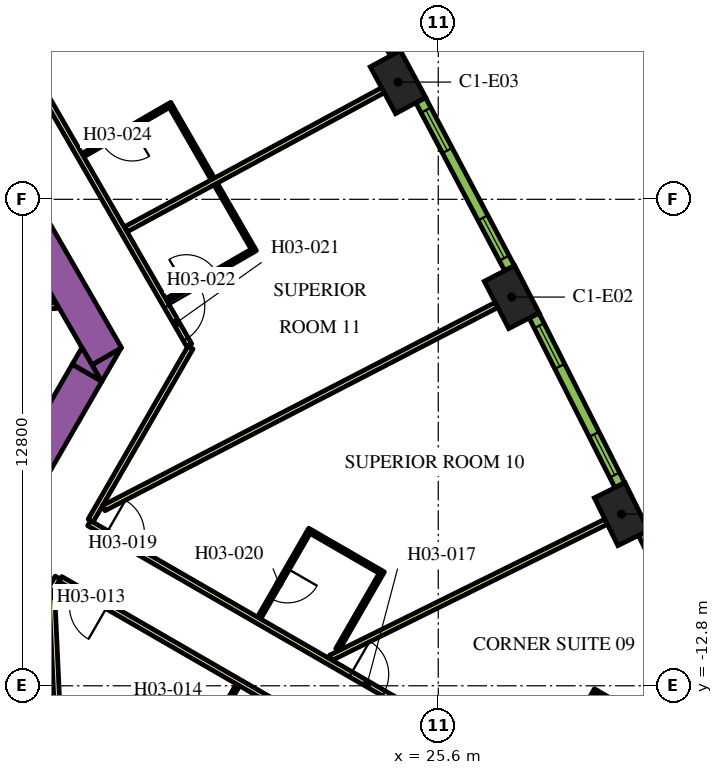
"""IFC4 building model, lengths in metres.
Left out: names, types, materials, properties, quantities, classifications, styles, units other than length and angle.
Written with IfcOpenShell. Run it as: python <this file> out.ifc"""

import sys

from ifc_helpers import new_model, si_unit, direction, frame, frame_2d, origin, origin_2d, place, context, subcontext, project, spatial, polyline, rectangle, outline, extrude, element, fill, save


model = new_model("IFC4")
c1 = context("Model", 3, precision=1e-05, world=origin(), true_north=direction((0.0, 1.0)))
c2 = subcontext(c1, "Body", "Model", "MODEL_VIEW")
j1 = project(units=[si_unit("LENGTHUNIT", "METRE"), si_unit("PLANEANGLEUNIT", "RADIAN")], contexts=[c1])
p1 = place(None, origin())
s1 = spatial("IfcSite", under=j1, at=p1, CompositionType="ELEMENT")
p2 = place(p1, origin())
s2 = spatial("IfcBuilding", under=s1, at=p2, CompositionType="ELEMENT")
p3 = place(p2, frame((0.0, 0.0, 54.9)))
s3 = spatial("IfcBuildingStorey", under=s2, at=p3, CompositionType="ELEMENT", Elevation=54.9)
for number, where, z_axis, x_axis in (
    (1, (30.421, -8.284, 0.0), (0.0, 0.0, 1.0), (-0.443, 0.897, 0.0)),
    (2, (27.533, -2.572, 0.0), (0.0, 0.0, 1.0), (-0.459, 0.888, 0.0)),
    (3, (24.54, 3.085, 0.0), (0.0, 0.0, 1.0), (-0.476, 0.88, 0.0)),
):
    element("IfcColumn", number, at=place(p3, frame(where, z_axis=z_axis, x_axis=x_axis)), inside=s3, PredefinedType="COLUMN", context=c2, shape_type="SweptSolid", body=[
        extrude(rectangle(XDim=1.4, YDim=0.9, at=origin_2d()), origin(), (0.0, 0.0, 1.0), 3.9),
    ])
p4 = place(p3, frame((6.776, 13.364, 0.0), z_axis=(0.0, 0.0, 1.0), x_axis=(0.500004177138, -0.8660229921, 0.0)))
e4 = element("IfcWall", 4, at=p4, inside=s3, PredefinedType="SOLIDWALL", context=c2, shape_type="SweptSolid", body=[
    extrude(rectangle(XDim=20.204, YDim=0.9, at=frame_2d((10.102, 0.0))), origin(), (0.0, 0.0, 1.0), 3.9),
])
p5 = place(p3, origin())
e5 = element("IfcWall", 5, at=p5, inside=s3, PredefinedType="SOLIDWALL", context=c2, shape_type="SweptSolid", body=[
    extrude(outline(polyline([(16.743, -4.8), (16.489, -4.36), (17.251, -3.92), (16.743, -4.8)])), origin(), (0.0, 0.0, 1.0), 3.9),
])
p6 = place(p3, frame((11.695, -12.644, 0.0), z_axis=(0.0, 0.0, 1.0), x_axis=(0.500010229568, 0.86601949766, 0.0)))
e6 = element("IfcWall", 6, at=p6, inside=s3, PredefinedType="SOLIDWALL", context=c2, shape_type="SweptSolid", body=[
    extrude(rectangle(XDim=9.326, YDim=0.9, at=frame_2d((4.663, 0.0))), origin(), (0.0, 0.0, 1.0), 3.9),
])
e7 = element("IfcWall", 7, at=p5, inside=s3, PredefinedType="SOLIDWALL", context=c2, shape_type="SweptSolid", body=[
    extrude(outline(polyline([(16.223, -3.9), (16.732, -4.78), (15.969, -4.34), (16.223, -3.9)])), origin(), (0.0, 0.0, 1.0), 3.9),
])
p7 = place(p3, frame((12.915, -2.8, 0.0), z_axis=(0.0, 0.0, 1.0), x_axis=(1.0, 0.0, 0.0)))
e8 = element("IfcWall", 8, at=p7, inside=s3, PredefinedType="PARTITIONING", context=c2, shape_type="SweptSolid", body=[
    extrude(rectangle(XDim=2.637, YDim=0.15, at=frame_2d((1.318, 0.0))), origin(), (0.0, 0.0, 1.0), 2.75),
])
p8 = place(p3, frame((16.412, -8.523, 0.0), z_axis=(0.0, 0.0, 1.0), x_axis=(0.866022197818, -0.500005552856, 0.0)))
e9 = element("IfcWall", 9, at=p8, inside=s3, PredefinedType="PARTITIONING", context=c2, shape_type="SweptSolid", body=[
    extrude(rectangle(XDim=16.224, YDim=0.15, at=frame_2d((8.112, 0.0))), origin(), (0.0, 0.0, 1.0), 2.75),
])
p9 = place(p8, frame((7.949, 0.0, 0.0)))
e10 = element("IfcOpeningElement", 10, at=p9, cuts=e9, PredefinedType="OPENING", context=c2, shape_type="SweptSolid", body=[
    extrude(rectangle(XDim=1.0, YDim=2.1, at=frame_2d((0.5, 1.05))), frame((0.0, 0.085, 0.0), z_axis=(0.0, -1.0, 0.0), x_axis=(1.0, 0.0, 0.0)), (0.0, 0.0, 1.0), 0.17),
])
p10 = place(p8, frame((0.526, 0.0, 0.0)))
e11 = element("IfcOpeningElement", 11, at=p10, cuts=e9, PredefinedType="OPENING", context=c2, shape_type="SweptSolid", body=[
    extrude(rectangle(XDim=1.0, YDim=2.1, at=frame_2d((0.5, 1.05))), frame((0.0, 0.085, 0.0), z_axis=(0.0, -1.0, 0.0), x_axis=(1.0, 0.0, 0.0)), (0.0, 0.0, 1.0), 0.17),
])
p11 = place(p3, frame((19.081, -3.9, 0.0), z_axis=(0.0, 0.0, 1.0), x_axis=(-0.499974327079, -0.866040225545, 0.0)))
e12 = element("IfcWall", 12, at=p11, inside=s3, PredefinedType="PARTITIONING", context=c2, shape_type="SweptSolid", body=[
    extrude(rectangle(XDim=5.258, YDim=0.15, at=frame_2d((2.629, 0.0))), origin(), (0.0, 0.0, 1.0), 2.75),
])
p12 = place(p3, frame((6.163, 18.475, 0.0), z_axis=(0.0, 0.0, 1.0), x_axis=(0.500001317485, -0.866024643133, 0.0)))
e13 = element("IfcWall", 13, at=p12, inside=s3, PredefinedType="PARTITIONING", context=c2, shape_type="SweptSolid", body=[
    extrude(rectangle(XDim=25.767, YDim=0.15, at=frame_2d((12.883, 0.0))), origin(), (0.0, 0.0, 1.0), 2.75),
])
p13 = place(p12, frame((24.586, 0.0, 0.0)))
e14 = element("IfcOpeningElement", 14, at=p13, cuts=e13, PredefinedType="OPENING", context=c2, shape_type="SweptSolid", body=[
    extrude(rectangle(XDim=1.0, YDim=2.1, at=frame_2d((0.5, 1.05))), frame((0.0, 0.085, 0.0), z_axis=(0.0, -1.0, 0.0), x_axis=(1.0, 0.0, 0.0)), (0.0, 0.0, 1.0), 0.17),
])
p14 = place(p12, frame((13.144, 0.0, 0.0)))
e15 = element("IfcOpeningElement", 15, at=p14, cuts=e13, PredefinedType="OPENING", context=c2, shape_type="SweptSolid", body=[
    extrude(rectangle(XDim=1.0, YDim=2.1, at=frame_2d((0.5, 1.05))), frame((0.0, 0.085, 0.0), z_axis=(0.0, -1.0, 0.0), x_axis=(1.0, 0.0, 0.0)), (0.0, 0.0, 1.0), 0.17),
])
p15 = place(p12, frame((11.692, 0.0, 0.0)))
e16 = element("IfcOpeningElement", 16, at=p15, cuts=e13, PredefinedType="OPENING", context=c2, shape_type="SweptSolid", body=[
    extrude(rectangle(XDim=1.0, YDim=2.1, at=frame_2d((0.5, 1.05))), frame((0.0, 0.085, 0.0), z_axis=(0.0, -1.0, 0.0), x_axis=(1.0, 0.0, 0.0)), (0.0, 0.0, 1.0), 0.17),
])
p16 = place(p12, frame((0.572, 0.0, 0.0)))
e17 = element("IfcOpeningElement", 17, at=p16, cuts=e13, PredefinedType="OPENING", context=c2, shape_type="SweptSolid", body=[
    extrude(rectangle(XDim=1.0, YDim=2.1, at=frame_2d((0.5, 1.05))), frame((0.0, 0.085, 0.0), z_axis=(0.0, -1.0, 0.0), x_axis=(1.0, 0.0, 0.0)), (0.0, 0.0, 1.0), 0.17),
])
p17 = place(p3, frame((15.587, -9.952, 0.0), z_axis=(0.0, 0.0, 1.0), x_axis=(-0.500016618951, -0.866015808616, 0.0)))
e18 = element("IfcWall", 18, at=p17, inside=s3, PredefinedType="PARTITIONING", context=c2, shape_type="SweptSolid", body=[
    extrude(rectangle(XDim=5.268, YDim=0.15, at=frame_2d((2.634, 0.0))), origin(), (0.0, 0.0, 1.0), 2.75),
])
p18 = place(p3, frame((29.638, -18.064, 0.0), z_axis=(0.0, 0.0, 1.0), x_axis=(-0.866026175601, 0.499998663172, 0.0)))
e19 = element("IfcWall", 19, at=p18, inside=s3, PredefinedType="PARTITIONING", context=c2, shape_type="SweptSolid", body=[
    extrude(rectangle(XDim=16.144, YDim=0.15, at=frame_2d((8.072, 0.0))), origin(), (0.0, 0.0, 1.0), 2.75),
])
p19 = place(p18, frame((14.714, 0.0, 0.0)))
e20 = element("IfcOpeningElement", 20, at=p19, cuts=e19, PredefinedType="OPENING", context=c2, shape_type="SweptSolid", body=[
    extrude(rectangle(XDim=1.0, YDim=2.1, at=frame_2d((0.5, 1.05))), frame((0.0, 0.085, 0.0), z_axis=(0.0, -1.0, 0.0), x_axis=(1.0, 0.0, 0.0)), (0.0, 0.0, 1.0), 0.17),
])
p20 = place(p18, frame((7.275, 0.0, 0.0)))
e21 = element("IfcOpeningElement", 21, at=p20, cuts=e19, PredefinedType="OPENING", context=c2, shape_type="SweptSolid", body=[
    extrude(rectangle(XDim=1.0, YDim=2.1, at=frame_2d((0.5, 1.05))), frame((0.0, 0.085, 0.0), z_axis=(0.0, -1.0, 0.0), x_axis=(1.0, 0.0, 0.0)), (0.0, 0.0, 1.0), 0.17),
])
p21 = place(p3, frame((15.973, -22.109, 0.0), z_axis=(0.0, 0.0, 1.0), x_axis=(-0.046191717129, 0.998932592955, 0.0)))
e22 = element("IfcWall", 22, at=p21, inside=s3, PredefinedType="PARTITIONING", context=c2, shape_type="SweptSolid", body=[
    extrude(rectangle(XDim=11.638, YDim=0.15, at=frame_2d((5.819, 0.0))), origin(), (0.0, 0.0, 1.0), 2.75),
])
p22 = place(p3, frame((27.134, -2.779, 0.0), z_axis=(0.0, 0.0, 1.0), x_axis=(-0.8882049501, -0.459447457951, 0.0)))
e23 = element("IfcWall", 23, at=p22, inside=s3, PredefinedType="PARTITIONING", context=c2, shape_type="SweptSolid", body=[
    extrude(rectangle(XDim=11.638, YDim=0.15, at=frame_2d((5.819, 0.0))), origin(), (0.0, 0.0, 1.0), 2.75),
])
p23 = place(p3, frame((24.145, 2.871, 0.0), z_axis=(0.0, 0.0, 1.0), x_axis=(-0.879551725039, -0.475803281809, 0.0)))
e24 = element("IfcWall", 24, at=p23, inside=s3, PredefinedType="PARTITIONING", context=c2, shape_type="SweptSolid", body=[
    extrude(rectangle(XDim=7.688, YDim=0.15, at=frame_2d((3.844, 0.0))), origin(), (0.0, 0.0, 1.0), 2.75),
])
p24 = place(p3, frame((30.018, -8.483, 0.0), z_axis=(0.0, 0.0, 1.0), x_axis=(-0.896544505264, -0.44295366584, 0.0)))
e25 = element("IfcWall", 25, at=p24, inside=s3, PredefinedType="PARTITIONING", context=c2, shape_type="SweptSolid", body=[
    extrude(rectangle(XDim=8.079, YDim=0.15, at=frame_2d((4.04, 0.0))), origin(), (0.0, 0.0, 1.0), 2.75),
])
p25 = place(p3, frame((20.33, -12.777, 0.0), z_axis=(0.0, 0.0, 1.0), x_axis=(-0.500006934395, -0.866021400173, 0.0)))
e26 = element("IfcWall", 26, at=p25, inside=s3, PredefinedType="PARTITIONING", context=c2, shape_type="SweptSolid", body=[
    extrude(rectangle(XDim=2.6, YDim=0.1, at=frame_2d((1.3, 0.0))), origin(), (0.0, 0.0, 1.0), 2.75),
])
p26 = place(p25, frame((0.6, 0.0, 0.0)))
e27 = element("IfcOpeningElement", 27, at=p26, cuts=e26, PredefinedType="OPENING", context=c2, shape_type="SweptSolid", body=[
    extrude(rectangle(XDim=0.9, YDim=2.1, at=frame_2d((0.45, 1.05))), frame((0.0, 0.06, 0.0), z_axis=(0.0, -1.0, 0.0), x_axis=(1.0, 0.0, 0.0)), (0.0, 0.0, 1.0), 0.12),
])
p27 = place(p3, frame((29.752, -12.905, 0.0), z_axis=(0.0, 0.0, 1.0), x_axis=(-0.500049511043, -0.865996816683, 0.0)))
e28 = element("IfcWall", 28, at=p27, inside=s3, PredefinedType="PARTITIONING", context=c2, shape_type="SweptSolid", body=[
    extrude(rectangle(XDim=2.8, YDim=0.1, at=frame_2d((1.4, 0.0))), origin(), (0.0, 0.0, 1.0), 2.75),
])
p28 = place(p27, frame((1.3, 0.0, 0.0)))
e29 = element("IfcOpeningElement", 29, at=p28, cuts=e28, PredefinedType="OPENING", context=c2, shape_type="SweptSolid", body=[
    extrude(rectangle(XDim=0.9, YDim=2.1, at=frame_2d((0.45, 1.05))), frame((0.0, 0.06, 0.0), z_axis=(0.0, -1.0, 0.0), x_axis=(1.0, 0.0, 0.0)), (0.0, 0.0, 1.0), 0.12),
])
p29 = place(p3, frame((29.771, -12.973, 0.0), z_axis=(0.0, 0.0, 1.0), x_axis=(0.865980596518, -0.500077600433, 0.0)))
e30 = element("IfcWall", 30, at=p29, inside=s3, PredefinedType="PARTITIONING", context=c2, shape_type="SweptSolid", body=[
    extrude(rectangle(XDim=2.4, YDim=0.1, at=frame_2d((1.2, 0.0))), origin(), (0.0, 0.0, 1.0), 2.75),
])
p30 = place(p3, frame((22.234, -8.68, 0.0), z_axis=(0.0, 0.0, 1.0), x_axis=(-0.50000943426, -0.866019956843, 0.0)))
e31 = element("IfcWall", 31, at=p30, inside=s3, PredefinedType="PARTITIONING", context=c2, shape_type="SweptSolid", body=[
    extrude(rectangle(XDim=2.7, YDim=0.1, at=frame_2d((1.35, 0.0))), origin(), (0.0, 0.0, 1.0), 2.75),
])
p31 = place(p30, frame((1.2, 0.0, 0.0)))
e32 = element("IfcOpeningElement", 32, at=p31, cuts=e31, PredefinedType="OPENING", context=c2, shape_type="SweptSolid", body=[
    extrude(rectangle(XDim=0.9, YDim=2.1, at=frame_2d((0.45, 1.05))), frame((0.0, 0.06, 0.0), z_axis=(0.0, -1.0, 0.0), x_axis=(1.0, 0.0, 0.0)), (0.0, 0.0, 1.0), 0.12),
])
p32 = place(p3, frame((22.252, -8.748, 0.0), z_axis=(0.0, 0.0, 1.0), x_axis=(0.866009402589, -0.500027713859, 0.0)))
e33 = element("IfcWall", 33, at=p32, inside=s3, PredefinedType="PARTITIONING", context=c2, shape_type="SweptSolid", body=[
    extrude(rectangle(XDim=2.1, YDim=0.1, at=frame_2d((1.05, 0.0))), origin(), (0.0, 0.0, 1.0), 2.75),
])
p33 = place(p3, frame((22.944, -11.85, 0.0), z_axis=(0.0, 0.0, 1.0), x_axis=(0.499940577336, 0.866059708757, 0.0)))
e34 = element("IfcWall", 34, at=p33, inside=s3, PredefinedType="PARTITIONING", context=c2, shape_type="SweptSolid", body=[
    extrude(rectangle(XDim=2.39, YDim=0.1, at=frame_2d((1.195, 0.0))), origin(), (0.0, 0.0, 1.0), 2.75),
])
p34 = place(p3, frame((18.451, -2.657, 0.0), z_axis=(0.0, 0.0, 1.0), x_axis=(0.86599734893, 0.500048589285, 0.0)))
e35 = element("IfcWall", 35, at=p34, inside=s3, PredefinedType="PARTITIONING", context=c2, shape_type="SweptSolid", body=[
    extrude(rectangle(XDim=2.7, YDim=0.1, at=frame_2d((1.35, 0.0))), origin(), (0.0, 0.0, 1.0), 2.75),
])
p35 = place(p34, frame((0.6, 0.0, 0.0)))
e36 = element("IfcOpeningElement", 36, at=p35, cuts=e35, PredefinedType="OPENING", context=c2, shape_type="SweptSolid", body=[
    extrude(rectangle(XDim=0.9, YDim=2.1, at=frame_2d((0.45, 1.05))), frame((0.0, 0.06, 0.0), z_axis=(0.0, -1.0, 0.0), x_axis=(1.0, 0.0, 0.0)), (0.0, 0.0, 1.0), 0.12),
])
p36 = place(p3, frame((20.716, -1.281, 0.0), z_axis=(0.0, 0.0, 1.0), x_axis=(-0.499969367985, 0.866043088465, 0.0)))
e37 = element("IfcWall", 37, at=p36, inside=s3, PredefinedType="PARTITIONING", context=c2, shape_type="SweptSolid", body=[
    extrude(rectangle(XDim=1.94, YDim=0.1, at=frame_2d((0.97, 0.0))), origin(), (0.0, 0.0, 1.0), 2.75),
])
p37 = place(p3, frame((18.586, 2.509, 0.0), z_axis=(0.0, 0.0, 1.0), x_axis=(-0.866059108428, -0.4999416173, 0.0)))
e38 = element("IfcWall", 38, at=p37, inside=s3, PredefinedType="PARTITIONING", context=c2, shape_type="SweptSolid", body=[
    extrude(rectangle(XDim=2.7, YDim=0.1, at=frame_2d((1.35, 0.0))), origin(), (0.0, 0.0, 1.0), 2.75),
])
p38 = place(p37, frame((1.2, 0.0, 0.0)))
e39 = element("IfcOpeningElement", 39, at=p38, cuts=e38, PredefinedType="OPENING", context=c2, shape_type="SweptSolid", body=[
    extrude(rectangle(XDim=0.9, YDim=2.1, at=frame_2d((0.45, 1.05))), frame((0.0, 0.06, 0.0), z_axis=(0.0, -1.0, 0.0), x_axis=(1.0, 0.0, 0.0)), (0.0, 0.0, 1.0), 0.12),
])
p39 = place(p3, frame((18.567, 2.441, 0.0), z_axis=(0.0, 0.0, 1.0), x_axis=(0.499946605688, -0.86605622881, 0.0)))
e40 = element("IfcWall", 40, at=p39, inside=s3, PredefinedType="PARTITIONING", context=c2, shape_type="SweptSolid", body=[
    extrude(rectangle(XDim=2.2, YDim=0.1, at=frame_2d((1.1, 0.0))), origin(), (0.0, 0.0, 1.0), 2.75),
])
p40 = place(p3, frame((33.176, -13.29, 0.0), z_axis=(0.0, 0.0, 1.0), x_axis=(-0.434664499056, 0.900592456808, 0.0)))
e41 = element("IfcWall", 41, at=p40, inside=s3, PredefinedType="SOLIDWALL", context=c2, shape_type="SweptSolid", body=[
    extrude(rectangle(XDim=5.006, YDim=0.29, at=frame_2d((2.503, 0.0))), origin(), (0.0, 0.0, 1.0), 3.65),
])
p41 = place(p40, frame((0.265, 0.0, 0.9)))
e42 = element("IfcOpeningElement", 42, at=p41, cuts=e41, PredefinedType="OPENING", context=c2, shape_type="SweptSolid", body=[
    extrude(rectangle(XDim=1.2, YDim=2.15, at=frame_2d((0.6, 1.075))), frame((0.0, 0.155, 0.0), z_axis=(0.0, -1.0, 0.0), x_axis=(1.0, 0.0, 0.0)), (0.0, 0.0, 1.0), 0.31),
])
p42 = place(p40, frame((3.496, 0.0, 0.9)))
e43 = element("IfcOpeningElement", 43, at=p42, cuts=e41, PredefinedType="OPENING", context=c2, shape_type="SweptSolid", body=[
    extrude(rectangle(XDim=1.2, YDim=2.15, at=frame_2d((0.6, 1.075))), frame((0.0, 0.155, 0.0), z_axis=(0.0, -1.0, 0.0), x_axis=(1.0, 0.0, 0.0)), (0.0, 0.0, 1.0), 0.31),
])
p43 = place(p3, frame((30.377, -7.521, 0.0), z_axis=(0.0, 0.0, 1.0), x_axis=(-0.451233929645, 0.892405704115, 0.0)))
e44 = element("IfcWall", 44, at=p43, inside=s3, PredefinedType="SOLIDWALL", context=c2, shape_type="SweptSolid", body=[
    extrude(rectangle(XDim=4.998, YDim=0.29, at=frame_2d((2.499, 0.0))), origin(), (0.0, 0.0, 1.0), 3.65),
])
p44 = place(p43, frame((0.297, 0.0, 0.9)))
e45 = element("IfcOpeningElement", 45, at=p44, cuts=e44, PredefinedType="OPENING", context=c2, shape_type="SweptSolid", body=[
    extrude(rectangle(XDim=1.2, YDim=2.15, at=frame_2d((0.6, 1.075))), frame((0.0, 0.155, 0.0), z_axis=(0.0, -1.0, 0.0), x_axis=(1.0, 0.0, 0.0)), (0.0, 0.0, 1.0), 0.31),
])
p45 = place(p43, frame((3.501, 0.0, 0.9)))
e46 = element("IfcOpeningElement", 46, at=p45, cuts=e44, PredefinedType="OPENING", context=c2, shape_type="SweptSolid", body=[
    extrude(rectangle(XDim=1.2, YDim=2.15, at=frame_2d((0.6, 1.075))), frame((0.0, 0.155, 0.0), z_axis=(0.0, -1.0, 0.0), x_axis=(1.0, 0.0, 0.0)), (0.0, 0.0, 1.0), 0.31),
])
p46 = place(p3, frame((27.475, -1.81, 0.0), z_axis=(0.0, 0.0, 1.0), x_axis=(-0.467629620899, 0.883924509026, 0.0)))
e47 = element("IfcWall", 47, at=p46, inside=s3, PredefinedType="SOLIDWALL", context=c2, shape_type="SweptSolid", body=[
    extrude(rectangle(XDim=4.998, YDim=0.29, at=frame_2d((2.499, 0.0))), origin(), (0.0, 0.0, 1.0), 3.65),
])
p47 = place(p46, frame((0.297, 0.0, 0.9)))
e48 = element("IfcOpeningElement", 48, at=p47, cuts=e47, PredefinedType="OPENING", context=c2, shape_type="SweptSolid", body=[
    extrude(rectangle(XDim=1.2, YDim=2.15, at=frame_2d((0.6, 1.075))), frame((0.0, 0.155, 0.0), z_axis=(0.0, -1.0, 0.0), x_axis=(1.0, 0.0, 0.0)), (0.0, 0.0, 1.0), 0.31),
])
p48 = place(p46, frame((3.501, 0.0, 0.9)))
e49 = element("IfcOpeningElement", 49, at=p48, cuts=e47, PredefinedType="OPENING", context=c2, shape_type="SweptSolid", body=[
    extrude(rectangle(XDim=1.2, YDim=2.15, at=frame_2d((0.6, 1.075))), frame((0.0, 0.155, 0.0), z_axis=(0.0, -1.0, 0.0), x_axis=(1.0, 0.0, 0.0)), (0.0, 0.0, 1.0), 0.31),
])
p49 = place(p3, frame((24.468, 3.846, 0.0), z_axis=(0.0, 0.0, 1.0), x_axis=(-0.483912572871, 0.875116347589, 0.0)))
e50 = element("IfcWall", 50, at=p49, inside=s3, PredefinedType="SOLIDWALL", context=c2, shape_type="SweptSolid", body=[
    extrude(rectangle(XDim=4.998, YDim=0.29, at=frame_2d((2.499, 0.0))), origin(), (0.0, 0.0, 1.0), 3.65),
])
p50 = place(p49, frame((0.297, 0.0, 0.9)))
e51 = element("IfcOpeningElement", 51, at=p50, cuts=e50, PredefinedType="OPENING", context=c2, shape_type="SweptSolid", body=[
    extrude(rectangle(XDim=1.2, YDim=2.15, at=frame_2d((0.6, 1.075))), frame((0.0, 0.155, 0.0), z_axis=(0.0, -1.0, 0.0), x_axis=(1.0, 0.0, 0.0)), (0.0, 0.0, 1.0), 0.31),
])
p51 = place(p49, frame((3.501, 0.0, 0.9)))
e52 = element("IfcOpeningElement", 52, at=p51, cuts=e50, PredefinedType="OPENING", context=c2, shape_type="SweptSolid", body=[
    extrude(rectangle(XDim=1.2, YDim=2.15, at=frame_2d((0.6, 1.075))), frame((0.0, 0.155, 0.0), z_axis=(0.0, -1.0, 0.0), x_axis=(1.0, 0.0, 0.0)), (0.0, 0.0, 1.0), 0.31),
])
p52 = place(p19, origin())
e53 = element("IfcDoor", 53, at=p52, inside=s3, OperationType="SINGLE_SWING_RIGHT", PredefinedType="DOOR", context=c2, shape_type="SweptSolid", body=[
    extrude(rectangle(XDim=1.0, YDim=2.1, at=frame_2d((0.5, 1.05))), frame((0.0, 0.025, 0.0), z_axis=(0.0, -1.0, 0.0), x_axis=(1.0, 0.0, 0.0)), (0.0, 0.0, 1.0), 0.05),
])
fill(e20, e53)
p53 = place(p9, origin())
e54 = element("IfcDoor", 54, at=p53, inside=s3, OperationType="SINGLE_SWING_LEFT", PredefinedType="DOOR", context=c2, shape_type="SweptSolid", body=[
    extrude(rectangle(XDim=1.0, YDim=2.1, at=frame_2d((0.5, 1.05))), frame((0.0, 0.025, 0.0), z_axis=(0.0, -1.0, 0.0), x_axis=(1.0, 0.0, 0.0)), (0.0, 0.0, 1.0), 0.05),
])
fill(e10, e54)
p54 = place(p10, origin())
e55 = element("IfcDoor", 55, at=p54, inside=s3, OperationType="SINGLE_SWING_LEFT", PredefinedType="DOOR", context=c2, shape_type="SweptSolid", body=[
    extrude(rectangle(XDim=1.0, YDim=2.1, at=frame_2d((0.5, 1.05))), frame((0.0, 0.025, 0.0), z_axis=(0.0, -1.0, 0.0), x_axis=(1.0, 0.0, 0.0)), (0.0, 0.0, 1.0), 0.05),
])
fill(e11, e55)
p55 = place(p31, origin())
e56 = element("IfcDoor", 56, at=p55, inside=s3, OperationType="SINGLE_SWING_LEFT", PredefinedType="DOOR", context=c2, shape_type="SweptSolid", body=[
    extrude(rectangle(XDim=0.9, YDim=2.1, at=frame_2d((0.45, 1.05))), frame((0.0, 0.025, 0.0), z_axis=(0.0, -1.0, 0.0), x_axis=(1.0, 0.0, 0.0)), (0.0, 0.0, 1.0), 0.05),
])
fill(e32, e56)
p56 = place(p13, origin())
e57 = element("IfcDoor", 57, at=p56, inside=s3, OperationType="SINGLE_SWING_RIGHT", PredefinedType="DOOR", context=c2, shape_type="SweptSolid", body=[
    extrude(rectangle(XDim=1.0, YDim=2.1, at=frame_2d((0.5, 1.05))), frame((0.0, 0.025, 0.0), z_axis=(0.0, -1.0, 0.0), x_axis=(1.0, 0.0, 0.0)), (0.0, 0.0, 1.0), 0.05),
])
fill(e14, e57)
p57 = place(p35, origin())
e58 = element("IfcDoor", 58, at=p57, inside=s3, OperationType="SINGLE_SWING_LEFT", PredefinedType="DOOR", context=c2, shape_type="SweptSolid", body=[
    extrude(rectangle(XDim=0.9, YDim=2.1, at=frame_2d((0.45, 1.05))), frame((0.0, 0.025, 0.0), z_axis=(0.0, -1.0, 0.0), x_axis=(1.0, 0.0, 0.0)), (0.0, 0.0, 1.0), 0.05),
])
fill(e36, e58)
p58 = place(p38, origin())
e59 = element("IfcDoor", 59, at=p58, inside=s3, OperationType="SINGLE_SWING_RIGHT", PredefinedType="DOOR", context=c2, shape_type="SweptSolid", body=[
    extrude(rectangle(XDim=0.9, YDim=2.1, at=frame_2d((0.45, 1.05))), frame((0.0, 0.025, 0.0), z_axis=(0.0, -1.0, 0.0), x_axis=(1.0, 0.0, 0.0)), (0.0, 0.0, 1.0), 0.05),
])
fill(e39, e59)
p59 = place(p44, origin())
e60 = element("IfcWindow", 60, at=p59, inside=s3, PartitioningType="DOUBLE_PANEL_VERTICAL", PredefinedType="WINDOW", context=c2, shape_type="SweptSolid", body=[
    extrude(rectangle(XDim=1.2, YDim=2.15, at=frame_2d((0.6, 1.075))), frame((0.0, 0.015, 0.0), z_axis=(0.0, -1.0, 0.0), x_axis=(1.0, 0.0, 0.0)), (0.0, 0.0, 1.0), 0.06),
])
fill(e45, e60)
p60 = place(p45, origin())
e61 = element("IfcWindow", 61, at=p60, inside=s3, PartitioningType="DOUBLE_PANEL_VERTICAL", PredefinedType="WINDOW", context=c2, shape_type="SweptSolid", body=[
    extrude(rectangle(XDim=1.2, YDim=2.15, at=frame_2d((0.6, 1.075))), frame((0.0, 0.015, 0.0), z_axis=(0.0, -1.0, 0.0), x_axis=(1.0, 0.0, 0.0)), (0.0, 0.0, 1.0), 0.06),
])
fill(e46, e61)
p61 = place(p47, origin())
e62 = element("IfcWindow", 62, at=p61, inside=s3, PartitioningType="DOUBLE_PANEL_VERTICAL", PredefinedType="WINDOW", context=c2, shape_type="SweptSolid", body=[
    extrude(rectangle(XDim=1.2, YDim=2.15, at=frame_2d((0.6, 1.075))), frame((0.0, 0.015, 0.0), z_axis=(0.0, -1.0, 0.0), x_axis=(1.0, 0.0, 0.0)), (0.0, 0.0, 1.0), 0.06),
])
fill(e48, e62)
p62 = place(p48, origin())
e63 = element("IfcWindow", 63, at=p62, inside=s3, PartitioningType="DOUBLE_PANEL_VERTICAL", PredefinedType="WINDOW", context=c2, shape_type="SweptSolid", body=[
    extrude(rectangle(XDim=1.2, YDim=2.15, at=frame_2d((0.6, 1.075))), frame((0.0, 0.015, 0.0), z_axis=(0.0, -1.0, 0.0), x_axis=(1.0, 0.0, 0.0)), (0.0, 0.0, 1.0), 0.06),
])
fill(e49, e63)
save(model, sys.argv[1])
